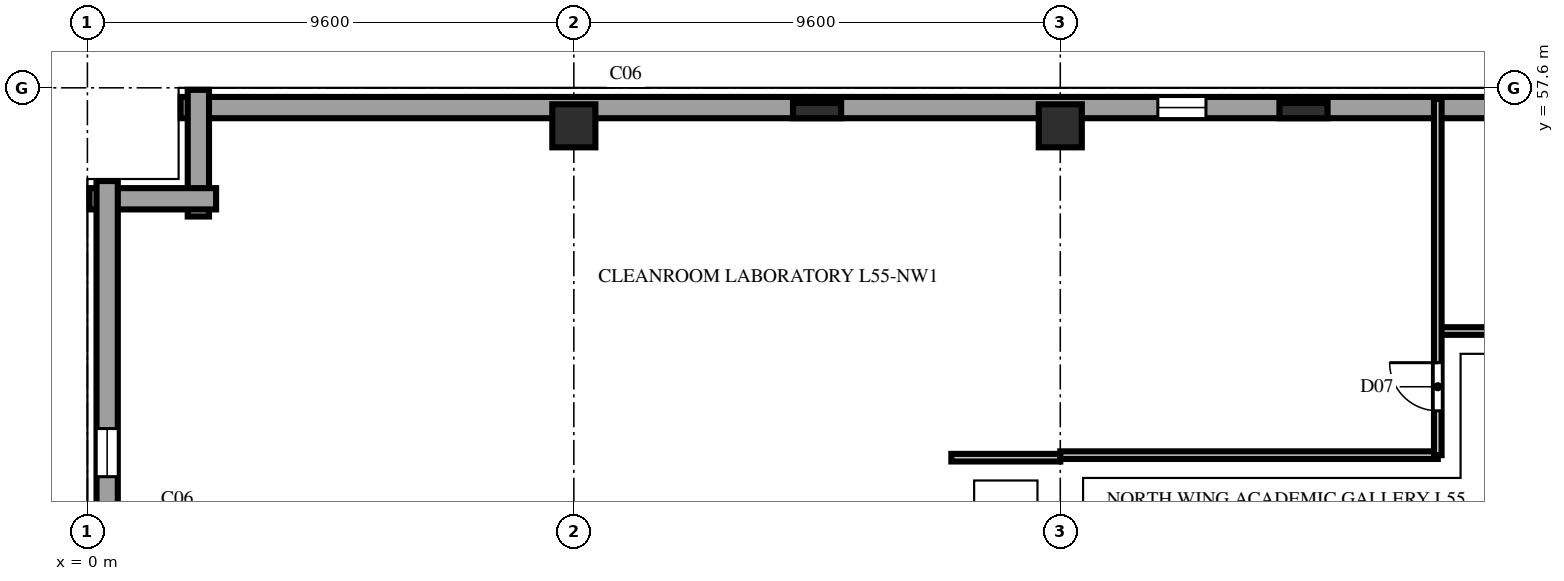
"""IFC4 building model, lengths in metres.
Left out: names, types, materials, properties, quantities, classifications, styles, units other than length and angle.
Written with IfcOpenShell. Run it as: python <this file> out.ifc"""

import sys

from ifc_helpers import new_model, si_unit, direction, frame, frame_2d, origin, origin_2d, place, context, subcontext, project, spatial, rectangle, extrude, element, fill, save


model = new_model("IFC4")
c1 = context("Model", 3, precision=1e-05, world=origin(), true_north=direction((0.0, 1.0)))
c2 = subcontext(c1, "Body", "Model", "MODEL_VIEW")
j1 = project(units=[si_unit("LENGTHUNIT", "METRE"), si_unit("PLANEANGLEUNIT", "RADIAN")], contexts=[c1])
p1 = place(None, origin())
s1 = spatial("IfcSite", under=j1, at=p1, CompositionType="ELEMENT")
p2 = place(p1, origin())
s2 = spatial("IfcBuilding", under=s1, at=p2, CompositionType="ELEMENT")
p3 = place(p2, frame((0.0, 0.0, 218.0)))
s3 = spatial("IfcBuildingStorey", under=s2, at=p3, CompositionType="ELEMENT", Elevation=218.0)
for number, where, z_axis, x_axis in (
    (1, (9.6, 56.85, 0.0), (0.0, 0.0, 1.0), (1.0, 0.0, 0.0)),
    (2, (19.2, 56.85, 0.0), (0.0, 0.0, 1.0), (1.0, 0.0, 0.0)),
):
    element("IfcColumn", number, at=place(p3, frame(where, z_axis=z_axis, x_axis=x_axis)), inside=s3, PredefinedType="COLUMN", context=c2, shape_type="SweptSolid", body=[
        extrude(rectangle(XDim=0.85, YDim=0.85, at=origin_2d()), origin(), (0.0, 0.0, 1.0), 3.8),
    ])
for number, where, z_axis, x_axis in (
    (3, (14.4, 57.15, 0.0), (0.0, 0.0, 1.0), (1.0, 0.0, 0.0)),
    (4, (24.0, 57.15, 0.0), (0.0, 0.0, 1.0), (1.0, 0.0, 0.0)),
):
    element("IfcColumn", number, at=place(p3, frame(where, z_axis=z_axis, x_axis=x_axis)), inside=s3, PredefinedType="PILASTER", context=c2, shape_type="SweptSolid", body=[
        extrude(rectangle(XDim=0.95, YDim=0.3, at=origin_2d()), origin(), (0.0, 0.0, 1.0), 3.8),
    ])
p4 = place(p3, frame((36.56, 57.21, 0.0), z_axis=(0.0, 0.0, 1.0), x_axis=(-1.0, 0.0, 0.0)))
e5 = element("IfcWall", 5, at=p4, inside=s3, PredefinedType="SOLIDWALL", context=c2, shape_type="SweptSolid", body=[
    extrude(rectangle(XDim=34.72, YDim=0.42, at=frame_2d((17.36, 0.0))), origin(), (0.0, 0.0, 1.0), 3.54),
])
p5 = place(p4, frame((4.885, 0.0, 0.9)))
e6 = element("IfcOpeningElement", 6, at=p5, cuts=e5, PredefinedType="OPENING", context=c2, shape_type="SweptSolid", body=[
    extrude(rectangle(XDim=0.95, YDim=1.85, at=frame_2d((0.475, 0.925))), frame((0.0, 0.222, 0.0), z_axis=(0.0, -1.0, 0.0), x_axis=(1.0, 0.0, 0.0)), (0.0, 0.0, 1.0), 0.444),
])
p6 = place(p4, frame((14.485, 0.0, 0.9)))
e7 = element("IfcOpeningElement", 7, at=p6, cuts=e5, PredefinedType="OPENING", context=c2, shape_type="SweptSolid", body=[
    extrude(rectangle(XDim=0.95, YDim=1.85, at=frame_2d((0.475, 0.925))), frame((0.0, 0.222, 0.0), z_axis=(0.0, -1.0, 0.0), x_axis=(1.0, 0.0, 0.0)), (0.0, 0.0, 1.0), 0.444),
])
for number, where, z_axis, x_axis in (
    (8, (2.19, 57.56, 0.0), (0.0, 0.0, 1.0), (0.0, -1.0, 0.0)),
    (9, (2.54, 55.41, 0.0), (0.0, 0.0, 1.0), (-1.0, 0.0, 0.0)),
):
    element("IfcWall", number, at=place(p3, frame(where, z_axis=z_axis, x_axis=x_axis)), inside=s3, PredefinedType="SOLIDWALL", context=c2, shape_type="SweptSolid", body=[
        extrude(rectangle(XDim=2.5, YDim=0.42, at=frame_2d((1.25, 0.0))), origin(), (0.0, 0.0, 1.0), 3.54),
    ])
p7 = place(p3, frame((0.39, 55.76, 0.0), z_axis=(0.0, 0.0, 1.0), x_axis=(0.0, -1.0, 0.0)))
e10 = element("IfcWall", 10, at=p7, inside=s3, PredefinedType="SOLIDWALL", context=c2, shape_type="SweptSolid", body=[
    extrude(rectangle(XDim=53.92, YDim=0.42, at=frame_2d((26.96, 0.0))), origin(), (0.0, 0.0, 1.0), 3.54),
])
p8 = place(p7, frame((4.885, 0.0, 0.9)))
e11 = element("IfcOpeningElement", 11, at=p8, cuts=e10, PredefinedType="OPENING", context=c2, shape_type="SweptSolid", body=[
    extrude(rectangle(XDim=0.95, YDim=1.85, at=frame_2d((0.475, 0.925))), frame((0.0, 0.222, 0.0), z_axis=(0.0, -1.0, 0.0), x_axis=(1.0, 0.0, 0.0)), (0.0, 0.0, 1.0), 0.444),
])
p9 = place(p7, frame((9.41, 0.0, 0.9)))
e12 = element("IfcOpeningElement", 12, at=p9, cuts=e10, PredefinedType="OPENING", context=c2, shape_type="SweptSolid", body=[
    extrude(rectangle(XDim=1.5, YDim=1.85, at=frame_2d((0.75, 0.925))), frame((0.0, 0.222, 0.0), z_axis=(0.0, -1.0, 0.0), x_axis=(1.0, 0.0, 0.0)), (0.0, 0.0, 1.0), 0.444),
])
p10 = place(p7, frame((14.485, 0.0, 0.9)))
e13 = element("IfcOpeningElement", 13, at=p10, cuts=e10, PredefinedType="OPENING", context=c2, shape_type="SweptSolid", body=[
    extrude(rectangle(XDim=0.95, YDim=1.85, at=frame_2d((0.475, 0.925))), frame((0.0, 0.222, 0.0), z_axis=(0.0, -1.0, 0.0), x_axis=(1.0, 0.0, 0.0)), (0.0, 0.0, 1.0), 0.444),
])
p11 = place(p7, frame((19.01, 0.0, 0.9)))
e14 = element("IfcOpeningElement", 14, at=p11, cuts=e10, PredefinedType="OPENING", context=c2, shape_type="SweptSolid", body=[
    extrude(rectangle(XDim=1.5, YDim=1.85, at=frame_2d((0.75, 0.925))), frame((0.0, 0.222, 0.0), z_axis=(0.0, -1.0, 0.0), x_axis=(1.0, 0.0, 0.0)), (0.0, 0.0, 1.0), 0.444),
])
p12 = place(p7, frame((24.085, 0.0, 0.9)))
e15 = element("IfcOpeningElement", 15, at=p12, cuts=e10, PredefinedType="OPENING", context=c2, shape_type="SweptSolid", body=[
    extrude(rectangle(XDim=0.95, YDim=1.85, at=frame_2d((0.475, 0.925))), frame((0.0, 0.222, 0.0), z_axis=(0.0, -1.0, 0.0), x_axis=(1.0, 0.0, 0.0)), (0.0, 0.0, 1.0), 0.444),
])
p13 = place(p7, frame((28.61, 0.0, 0.9)))
e16 = element("IfcOpeningElement", 16, at=p13, cuts=e10, PredefinedType="OPENING", context=c2, shape_type="SweptSolid", body=[
    extrude(rectangle(XDim=1.5, YDim=1.85, at=frame_2d((0.75, 0.925))), frame((0.0, 0.222, 0.0), z_axis=(0.0, -1.0, 0.0), x_axis=(1.0, 0.0, 0.0)), (0.0, 0.0, 1.0), 0.444),
])
p14 = place(p7, frame((33.685, 0.0, 0.9)))
e17 = element("IfcOpeningElement", 17, at=p14, cuts=e10, PredefinedType="OPENING", context=c2, shape_type="SweptSolid", body=[
    extrude(rectangle(XDim=0.95, YDim=1.85, at=frame_2d((0.475, 0.925))), frame((0.0, 0.222, 0.0), z_axis=(0.0, -1.0, 0.0), x_axis=(1.0, 0.0, 0.0)), (0.0, 0.0, 1.0), 0.444),
])
p15 = place(p7, frame((38.21, 0.0, 0.9)))
e18 = element("IfcOpeningElement", 18, at=p15, cuts=e10, PredefinedType="OPENING", context=c2, shape_type="SweptSolid", body=[
    extrude(rectangle(XDim=1.5, YDim=1.85, at=frame_2d((0.75, 0.925))), frame((0.0, 0.222, 0.0), z_axis=(0.0, -1.0, 0.0), x_axis=(1.0, 0.0, 0.0)), (0.0, 0.0, 1.0), 0.444),
])
p16 = place(p7, frame((43.285, 0.0, 0.9)))
e19 = element("IfcOpeningElement", 19, at=p16, cuts=e10, PredefinedType="OPENING", context=c2, shape_type="SweptSolid", body=[
    extrude(rectangle(XDim=0.95, YDim=1.85, at=frame_2d((0.475, 0.925))), frame((0.0, 0.222, 0.0), z_axis=(0.0, -1.0, 0.0), x_axis=(1.0, 0.0, 0.0)), (0.0, 0.0, 1.0), 0.444),
])
p17 = place(p7, frame((47.81, 0.0, 0.9)))
e20 = element("IfcOpeningElement", 20, at=p17, cuts=e10, PredefinedType="OPENING", context=c2, shape_type="SweptSolid", body=[
    extrude(rectangle(XDim=1.5, YDim=1.85, at=frame_2d((0.75, 0.925))), frame((0.0, 0.222, 0.0), z_axis=(0.0, -1.0, 0.0), x_axis=(1.0, 0.0, 0.0)), (0.0, 0.0, 1.0), 0.444),
])
p18 = place(p3, frame((17.05, 50.3, 0.0), z_axis=(0.0, 0.0, 1.0), x_axis=(1.0, 0.0, 0.0)))
e21 = element("IfcWall", 21, at=p18, inside=s3, PredefinedType="PARTITIONING", context=c2, shape_type="SweptSolid", body=[
    extrude(rectangle(XDim=2.15, YDim=0.15, at=frame_2d((1.075, 0.0))), origin(), (0.0, 0.0, 1.0), 3.54),
])
p19 = place(p3, frame((19.2, 50.35, 0.0), z_axis=(0.0, 0.0, 1.0), x_axis=(1.0, 0.0, 0.0)))
e22 = element("IfcWall", 22, at=p19, inside=s3, PredefinedType="PARTITIONING", context=c2, shape_type="SweptSolid", body=[
    extrude(rectangle(XDim=7.45, YDim=0.15, at=frame_2d((3.725, 0.0))), origin(), (0.0, 0.0, 1.0), 3.54),
])
p20 = place(p3, frame((26.65, 52.8, 0.0), z_axis=(0.0, 0.0, 1.0), x_axis=(1.0, 0.0, 0.0)))
e23 = element("IfcWall", 23, at=p20, inside=s3, PredefinedType="PARTITIONING", context=c2, shape_type="SweptSolid", body=[
    extrude(rectangle(XDim=2.15, YDim=0.15, at=frame_2d((1.075, 0.0))), origin(), (0.0, 0.0, 1.0), 3.54),
])
p21 = place(p3, frame((26.65, 50.35, 0.0), z_axis=(0.0, 0.0, 1.0), x_axis=(0.0, 1.0, 0.0)))
e24 = element("IfcWall", 24, at=p21, inside=s3, PredefinedType="PARTITIONING", context=c2, shape_type="SweptSolid", body=[
    extrude(rectangle(XDim=7.03, YDim=0.15, at=frame_2d((3.515, 0.0))), origin(), (0.0, 0.0, 1.0), 3.54),
])
p22 = place(p21, frame((0.875, 0.0, 0.0)))
e25 = element("IfcOpeningElement", 25, at=p22, cuts=e24, PredefinedType="OPENING", context=c2, shape_type="SweptSolid", body=[
    extrude(rectangle(XDim=0.95, YDim=2.15, at=frame_2d((0.475, 1.075))), frame((0.0, 0.087, 0.0), z_axis=(0.0, -1.0, 0.0), x_axis=(1.0, 0.0, 0.0)), (0.0, 0.0, 1.0), 0.174),
])
p23 = place(p6, origin())
e26 = element("IfcWindow", 26, at=p23, inside=s3, PartitioningType="SINGLE_PANEL", PredefinedType="WINDOW", context=c2, shape_type="SweptSolid", body=[
    extrude(rectangle(XDim=0.95, YDim=1.85, at=frame_2d((0.475, 0.925))), frame((0.0, 0.11, 0.0), z_axis=(0.0, -1.0, 0.0), x_axis=(1.0, 0.0, 0.0)), (0.0, 0.0, 1.0), 0.06),
])
fill(e7, e26)
p24 = place(p8, origin())
e27 = element("IfcWindow", 27, at=p24, inside=s3, PartitioningType="SINGLE_PANEL", PredefinedType="WINDOW", context=c2, shape_type="SweptSolid", body=[
    extrude(rectangle(XDim=0.95, YDim=1.85, at=frame_2d((0.475, 0.925))), frame((0.0, 0.11, 0.0), z_axis=(0.0, -1.0, 0.0), x_axis=(1.0, 0.0, 0.0)), (0.0, 0.0, 1.0), 0.06),
])
fill(e11, e27)
p25 = place(p22, origin())
e28 = element("IfcDoor", 28, at=p25, inside=s3, OperationType="SINGLE_SWING_RIGHT", PredefinedType="DOOR", context=c2, shape_type="SweptSolid", body=[
    extrude(rectangle(XDim=0.95, YDim=2.15, at=frame_2d((0.475, 1.075))), frame((0.0, 0.025, 0.0), z_axis=(0.0, -1.0, 0.0), x_axis=(1.0, 0.0, 0.0)), (0.0, 0.0, 1.0), 0.05),
])
fill(e25, e28)
save(model, sys.argv[1])
